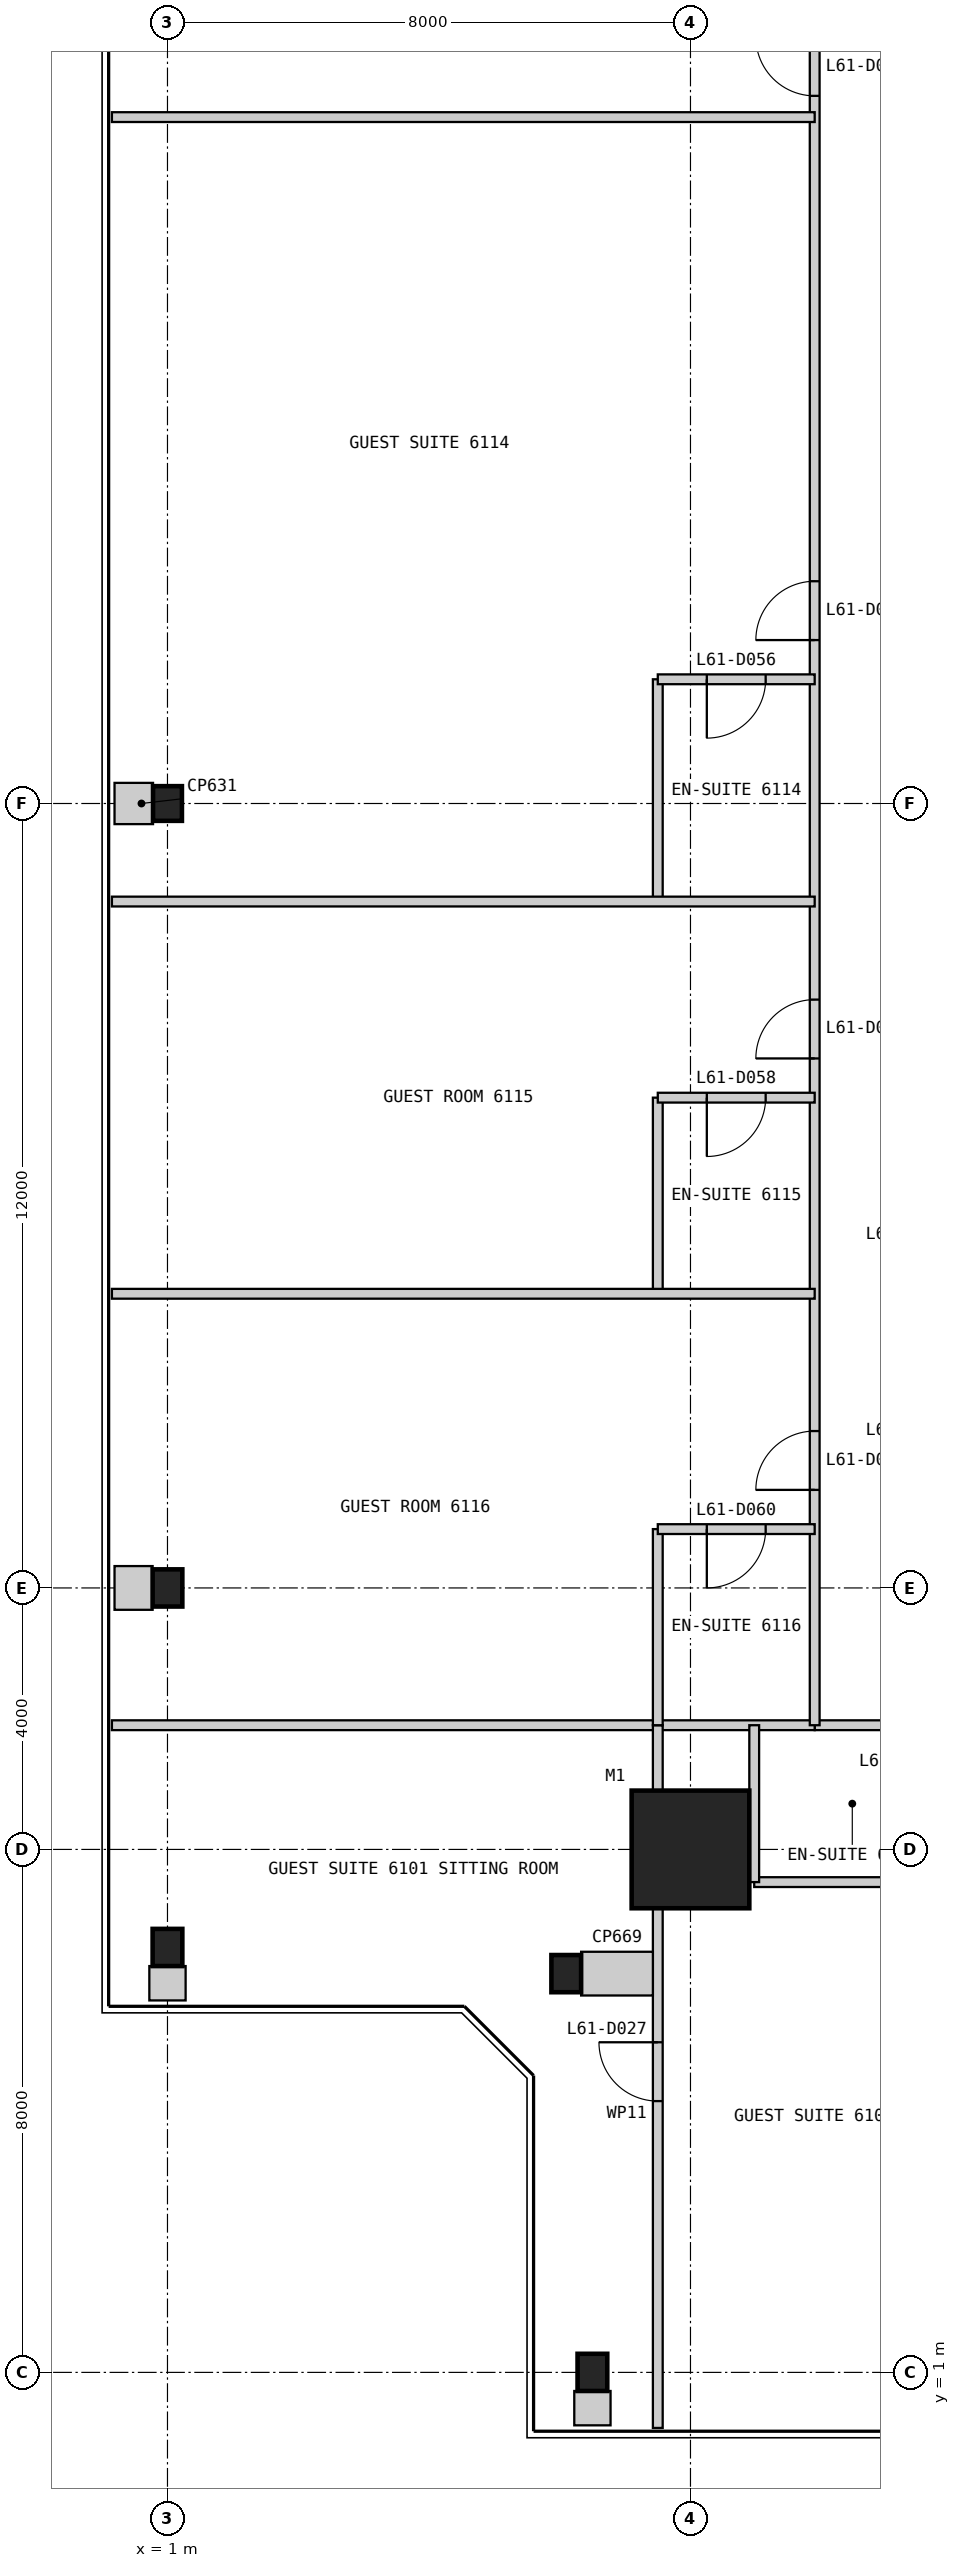
"""IFC4 building model, lengths in metres.
Left out: names, types, materials, properties, quantities, classifications, styles, units other than length and angle.
Written with IfcOpenShell. Run it as: python <this file> out.ifc"""

import sys

from ifc_helpers import new_model, si_unit, direction, frame, frame_2d, origin, origin_2d, place, context, subcontext, project, spatial, rectangle, i_section, extrude, element, fill, save


model = new_model("IFC4")
c1 = context("Model", 3, precision=1e-05, world=origin(), true_north=direction((0.0, 1.0)))
c2 = subcontext(c1, "Body", "Model", "MODEL_VIEW")
j1 = project(units=[si_unit("LENGTHUNIT", "METRE"), si_unit("PLANEANGLEUNIT", "RADIAN")], contexts=[c1])
p1 = place(None, origin())
s1 = spatial("IfcSite", under=j1, at=p1, CompositionType="ELEMENT")
p2 = place(p1, origin())
s2 = spatial("IfcBuilding", under=s1, at=p2, CompositionType="ELEMENT")
p3 = place(p2, frame((0.0, 0.0, 259.4)))
s3 = spatial("IfcBuildingStorey", under=s2, at=p3, CompositionType="ELEMENT", Elevation=259.4)
p4 = place(p3, frame((9.0, 9.0, 0.0), z_axis=(0.0, 0.0, 1.0), x_axis=(1.0, 0.0, 0.0)))
e1 = element("IfcColumn", 1, at=p4, inside=s3, PredefinedType="COLUMN", context=c2, shape_type="SweptSolid", body=[
    extrude(rectangle(XDim=1.8, YDim=1.8, at=origin_2d()), origin(), (0.0, 0.0, 1.0), 3.4),
])
p5 = place(p3, frame((7.5, 1.0, 0.0), z_axis=(0.0, 0.0, 1.0), x_axis=(1.0, 0.0, 0.0)))
e2 = element("IfcColumn", 2, at=p5, inside=s3, PredefinedType="COLUMN", context=c2, shape_type="SweptSolid", body=[
    extrude(i_section(OverallWidth=0.455, OverallDepth=0.569, WebThickness=0.078, FlangeThickness=0.125, at=origin_2d()), origin(), (0.0, 0.0, 1.0), 3.4),
])
p6 = place(p3, frame((1.0, 25.0, 0.0), z_axis=(0.0, 0.0, 1.0), x_axis=(1.0, 0.0, 0.0)))
e3 = element("IfcColumn", 3, at=p6, inside=s3, PredefinedType="COLUMN", context=c2, shape_type="SweptSolid", body=[
    extrude(i_section(OverallWidth=0.442, OverallDepth=0.531, WebThickness=0.066, FlangeThickness=0.106, at=origin_2d()), origin(), (0.0, 0.0, 1.0), 3.4),
])
for number, where, z_axis, x_axis in (
    (4, (1.0, 13.0, 0.0), (0.0, 0.0, 1.0), (1.0, 0.0, 0.0)),
    (5, (1.0, 7.5, 0.0), (0.0, 0.0, 1.0), (1.0, 0.0, 0.0)),
    (6, (7.1, 7.1, 0.0), (0.0, 0.0, 1.0), (1.0, 0.0, 0.0)),
):
    element("IfcColumn", number, at=place(p3, frame(where, z_axis=z_axis, x_axis=x_axis)), inside=s3, PredefinedType="COLUMN", context=c2, shape_type="SweptSolid", body=[
        extrude(i_section(OverallWidth=0.455, OverallDepth=0.569, WebThickness=0.078, FlangeThickness=0.125, at=origin_2d()), origin(), (0.0, 0.0, 1.0), 3.4),
    ])
p7 = place(p3, frame((10.9, 10.9, 0.0), z_axis=(0.0, 0.0, 1.0), x_axis=(1.0, 0.0, 0.0)))
e7 = element("IfcWall", 7, at=p7, inside=s3, PredefinedType="PARTITIONING", context=c2, shape_type="SweptSolid", body=[
    extrude(rectangle(XDim=28.2, YDim=0.15, at=frame_2d((14.1, 0.0))), origin(), (0.0, 0.0, 1.0), 3.25),
])
p8 = place(p7, frame((2.375, 0.0, 0.0)))
e8 = element("IfcOpeningElement", 8, at=p8, cuts=e7, PredefinedType="OPENING", context=c2, shape_type="SweptSolid", body=[
    extrude(rectangle(XDim=0.9, YDim=2.1, at=frame_2d((0.45, 1.05))), frame((0.0, 0.085, 0.0), z_axis=(0.0, -1.0, 0.0), x_axis=(1.0, 0.0, 0.0)), (0.0, 0.0, 1.0), 0.17),
])
p9 = place(p7, frame((10.7, 0.0, 0.0)))
e9 = element("IfcOpeningElement", 9, at=p9, cuts=e7, PredefinedType="OPENING", context=c2, shape_type="SweptSolid", body=[
    extrude(rectangle(XDim=0.9, YDim=2.1, at=frame_2d((0.45, 1.05))), frame((0.0, 0.085, 0.0), z_axis=(0.0, -1.0, 0.0), x_axis=(1.0, 0.0, 0.0)), (0.0, 0.0, 1.0), 0.17),
])
p10 = place(p7, frame((16.8, 0.0, 0.0)))
e10 = element("IfcOpeningElement", 10, at=p10, cuts=e7, PredefinedType="OPENING", context=c2, shape_type="SweptSolid", body=[
    extrude(rectangle(XDim=1.0, YDim=2.1, at=frame_2d((0.5, 1.05))), frame((0.0, 0.085, 0.0), z_axis=(0.0, -1.0, 0.0), x_axis=(1.0, 0.0, 0.0)), (0.0, 0.0, 1.0), 0.17),
])
p11 = place(p7, frame((23.7, 0.0, 0.0)))
e11 = element("IfcOpeningElement", 11, at=p11, cuts=e7, PredefinedType="OPENING", context=c2, shape_type="SweptSolid", body=[
    extrude(rectangle(XDim=0.9, YDim=2.1, at=frame_2d((0.45, 1.05))), frame((0.0, 0.085, 0.0), z_axis=(0.0, -1.0, 0.0), x_axis=(1.0, 0.0, 0.0)), (0.0, 0.0, 1.0), 0.17),
])
p12 = place(p3, frame((0.15, 10.9, 0.0), z_axis=(0.0, 0.0, 1.0), x_axis=(1.0, 0.0, 0.0)))
e12 = element("IfcWall", 12, at=p12, inside=s3, PredefinedType="PARTITIONING", context=c2, shape_type="SweptSolid", body=[
    extrude(rectangle(XDim=10.75, YDim=0.15, at=frame_2d((5.375, 0.0))), origin(), (0.0, 0.0, 1.0), 3.25),
])
p13 = place(p3, frame((9.975, 8.5, 0.0), z_axis=(0.0, 0.0, 1.0), x_axis=(1.0, 0.0, 0.0)))
e13 = element("IfcWall", 13, at=p13, inside=s3, PredefinedType="PARTITIONING", context=c2, shape_type="SweptSolid", body=[
    extrude(rectangle(XDim=3.0, YDim=0.15, at=frame_2d((1.5, 0.0))), origin(), (0.0, 0.0, 1.0), 3.25),
])
p14 = place(p3, frame((9.975, 8.5, 0.0), z_axis=(0.0, 0.0, 1.0), x_axis=(0.0, 1.0, 0.0)))
e14 = element("IfcWall", 14, at=p14, inside=s3, PredefinedType="PARTITIONING", context=c2, shape_type="SweptSolid", body=[
    extrude(rectangle(XDim=2.4, YDim=0.15, at=frame_2d((1.2, 0.0))), origin(), (0.0, 0.0, 1.0), 3.25),
])
p15 = place(p3, frame((8.5, 0.15, 0.0), z_axis=(0.0, 0.0, 1.0), x_axis=(0.0, 1.0, 0.0)))
e15 = element("IfcWall", 15, at=p15, inside=s3, PredefinedType="PARTITIONING", context=c2, shape_type="SweptSolid", body=[
    extrude(rectangle(XDim=10.75, YDim=0.15, at=frame_2d((5.375, 0.0))), origin(), (0.0, 0.0, 1.0), 3.25),
])
p16 = place(p15, frame((5.0, 0.0, 0.0)))
e16 = element("IfcOpeningElement", 16, at=p16, cuts=e15, PredefinedType="OPENING", context=c2, shape_type="SweptSolid", body=[
    extrude(rectangle(XDim=0.9, YDim=2.1, at=frame_2d((0.45, 1.05))), frame((0.0, 0.085, 0.0), z_axis=(0.0, -1.0, 0.0), x_axis=(1.0, 0.0, 0.0)), (0.0, 0.0, 1.0), 0.17),
])
p17 = place(p3, frame((10.9, 39.1, 0.0), z_axis=(0.0, 0.0, 1.0), x_axis=(0.0, -1.0, 0.0)))
e17 = element("IfcWall", 17, at=p17, inside=s3, PredefinedType="PARTITIONING", context=c2, shape_type="SweptSolid", body=[
    extrude(rectangle(XDim=28.2, YDim=0.15, at=frame_2d((14.1, 0.0))), origin(), (0.0, 0.0, 1.0), 3.25),
])
p18 = place(p17, frame((2.375, 0.0, 0.0)))
e18 = element("IfcOpeningElement", 18, at=p18, cuts=e17, PredefinedType="OPENING", context=c2, shape_type="SweptSolid", body=[
    extrude(rectangle(XDim=0.9, YDim=2.1, at=frame_2d((0.45, 1.05))), frame((0.0, 0.085, 0.0), z_axis=(0.0, -1.0, 0.0), x_axis=(1.0, 0.0, 0.0)), (0.0, 0.0, 1.0), 0.17),
])
p19 = place(p17, frame((10.7, 0.0, 0.0)))
e19 = element("IfcOpeningElement", 19, at=p19, cuts=e17, PredefinedType="OPENING", context=c2, shape_type="SweptSolid", body=[
    extrude(rectangle(XDim=0.9, YDim=2.1, at=frame_2d((0.45, 1.05))), frame((0.0, 0.085, 0.0), z_axis=(0.0, -1.0, 0.0), x_axis=(1.0, 0.0, 0.0)), (0.0, 0.0, 1.0), 0.17),
])
p20 = place(p17, frame((17.1, 0.0, 0.0)))
e20 = element("IfcOpeningElement", 20, at=p20, cuts=e17, PredefinedType="OPENING", context=c2, shape_type="SweptSolid", body=[
    extrude(rectangle(XDim=0.9, YDim=2.1, at=frame_2d((0.45, 1.05))), frame((0.0, 0.085, 0.0), z_axis=(0.0, -1.0, 0.0), x_axis=(1.0, 0.0, 0.0)), (0.0, 0.0, 1.0), 0.17),
])
p21 = place(p17, frame((23.7, 0.0, 0.0)))
e21 = element("IfcOpeningElement", 21, at=p21, cuts=e17, PredefinedType="OPENING", context=c2, shape_type="SweptSolid", body=[
    extrude(rectangle(XDim=0.9, YDim=2.1, at=frame_2d((0.45, 1.05))), frame((0.0, 0.085, 0.0), z_axis=(0.0, -1.0, 0.0), x_axis=(1.0, 0.0, 0.0)), (0.0, 0.0, 1.0), 0.17),
])
p22 = place(p3, frame((0.15, 35.5, 0.0), z_axis=(0.0, 0.0, 1.0), x_axis=(1.0, 0.0, 0.0)))
e22 = element("IfcWall", 22, at=p22, inside=s3, PredefinedType="PARTITIONING", context=c2, shape_type="SweptSolid", body=[
    extrude(rectangle(XDim=10.75, YDim=0.15, at=frame_2d((5.375, 0.0))), origin(), (0.0, 0.0, 1.0), 3.25),
])
p23 = place(p3, frame((8.5, 26.9, 0.0), z_axis=(0.0, 0.0, 1.0), x_axis=(0.0, -1.0, 0.0)))
e23 = element("IfcWall", 23, at=p23, inside=s3, PredefinedType="PARTITIONING", context=c2, shape_type="SweptSolid", body=[
    extrude(rectangle(XDim=3.4, YDim=0.15, at=frame_2d((1.7, 0.0))), origin(), (0.0, 0.0, 1.0), 3.25),
])
p24 = place(p3, frame((8.5, 26.9, 0.0), z_axis=(0.0, 0.0, 1.0), x_axis=(1.0, 0.0, 0.0)))
e24 = element("IfcWall", 24, at=p24, inside=s3, PredefinedType="PARTITIONING", context=c2, shape_type="SweptSolid", body=[
    extrude(rectangle(XDim=2.4, YDim=0.15, at=frame_2d((1.2, 0.0))), origin(), (0.0, 0.0, 1.0), 3.25),
])
p25 = place(p24, frame((0.75, 0.0, 0.0)))
e25 = element("IfcOpeningElement", 25, at=p25, cuts=e24, PredefinedType="OPENING", context=c2, shape_type="SweptSolid", body=[
    extrude(rectangle(XDim=0.9, YDim=2.1, at=frame_2d((0.45, 1.05))), frame((0.0, 0.085, 0.0), z_axis=(0.0, -1.0, 0.0), x_axis=(1.0, 0.0, 0.0)), (0.0, 0.0, 1.0), 0.17),
])
p26 = place(p3, frame((0.15, 23.5, 0.0), z_axis=(0.0, 0.0, 1.0), x_axis=(1.0, 0.0, 0.0)))
e26 = element("IfcWall", 26, at=p26, inside=s3, PredefinedType="PARTITIONING", context=c2, shape_type="SweptSolid", body=[
    extrude(rectangle(XDim=10.75, YDim=0.15, at=frame_2d((5.375, 0.0))), origin(), (0.0, 0.0, 1.0), 3.25),
])
p27 = place(p3, frame((8.5, 20.5, 0.0), z_axis=(0.0, 0.0, 1.0), x_axis=(0.0, -1.0, 0.0)))
e27 = element("IfcWall", 27, at=p27, inside=s3, PredefinedType="PARTITIONING", context=c2, shape_type="SweptSolid", body=[
    extrude(rectangle(XDim=3.0, YDim=0.15, at=frame_2d((1.5, 0.0))), origin(), (0.0, 0.0, 1.0), 3.25),
])
p28 = place(p3, frame((8.5, 20.5, 0.0), z_axis=(0.0, 0.0, 1.0), x_axis=(1.0, 0.0, 0.0)))
e28 = element("IfcWall", 28, at=p28, inside=s3, PredefinedType="PARTITIONING", context=c2, shape_type="SweptSolid", body=[
    extrude(rectangle(XDim=2.4, YDim=0.15, at=frame_2d((1.2, 0.0))), origin(), (0.0, 0.0, 1.0), 3.25),
])
p29 = place(p28, frame((0.75, 0.0, 0.0)))
e29 = element("IfcOpeningElement", 29, at=p29, cuts=e28, PredefinedType="OPENING", context=c2, shape_type="SweptSolid", body=[
    extrude(rectangle(XDim=0.9, YDim=2.1, at=frame_2d((0.45, 1.05))), frame((0.0, 0.085, 0.0), z_axis=(0.0, -1.0, 0.0), x_axis=(1.0, 0.0, 0.0)), (0.0, 0.0, 1.0), 0.17),
])
p30 = place(p3, frame((0.15, 17.5, 0.0), z_axis=(0.0, 0.0, 1.0), x_axis=(1.0, 0.0, 0.0)))
e30 = element("IfcWall", 30, at=p30, inside=s3, PredefinedType="PARTITIONING", context=c2, shape_type="SweptSolid", body=[
    extrude(rectangle(XDim=10.75, YDim=0.15, at=frame_2d((5.375, 0.0))), origin(), (0.0, 0.0, 1.0), 3.25),
])
p31 = place(p3, frame((8.5, 13.9, 0.0), z_axis=(0.0, 0.0, 1.0), x_axis=(0.0, -1.0, 0.0)))
e31 = element("IfcWall", 31, at=p31, inside=s3, PredefinedType="PARTITIONING", context=c2, shape_type="SweptSolid", body=[
    extrude(rectangle(XDim=3.0, YDim=0.15, at=frame_2d((1.5, 0.0))), origin(), (0.0, 0.0, 1.0), 3.25),
])
p32 = place(p3, frame((8.5, 13.9, 0.0), z_axis=(0.0, 0.0, 1.0), x_axis=(1.0, 0.0, 0.0)))
e32 = element("IfcWall", 32, at=p32, inside=s3, PredefinedType="PARTITIONING", context=c2, shape_type="SweptSolid", body=[
    extrude(rectangle(XDim=2.4, YDim=0.15, at=frame_2d((1.2, 0.0))), origin(), (0.0, 0.0, 1.0), 3.25),
])
p33 = place(p32, frame((0.75, 0.0, 0.0)))
e33 = element("IfcOpeningElement", 33, at=p33, cuts=e32, PredefinedType="OPENING", context=c2, shape_type="SweptSolid", body=[
    extrude(rectangle(XDim=0.9, YDim=2.1, at=frame_2d((0.45, 1.05))), frame((0.0, 0.085, 0.0), z_axis=(0.0, -1.0, 0.0), x_axis=(1.0, 0.0, 0.0)), (0.0, 0.0, 1.0), 0.17),
])
for number, where, z_axis, x_axis in (
    (34, (7.5, 0.19, 0.0), (0.0, 0.0, 1.0), (0.0, 1.0, 0.0)),
    (35, (1.0, 6.69, 0.0), (0.0, 0.0, 1.0), (0.0, 1.0, 0.0)),
):
    element("IfcWall", number, at=place(p3, frame(where, z_axis=z_axis, x_axis=x_axis)), inside=s3, PredefinedType="PARTITIONING", context=c2, shape_type="SweptSolid", body=[
        extrude(rectangle(XDim=0.526, YDim=0.555, at=frame_2d((0.263, 0.0))), origin(), (0.0, 0.0, 1.0), 3.25),
    ])
p34 = place(p3, frame((8.425, 7.1, 0.0), z_axis=(0.0, 0.0, 1.0), x_axis=(-1.0, 0.0, 0.0)))
e36 = element("IfcWall", 36, at=p34, inside=s3, PredefinedType="PARTITIONING", context=c2, shape_type="SweptSolid", body=[
    extrude(rectangle(XDim=1.098, YDim=0.669, at=frame_2d((0.549, 0.0))), origin(), (0.0, 0.0, 1.0), 3.25),
])
p35 = place(p3, frame((0.19, 25.0, 0.0), z_axis=(0.0, 0.0, 1.0), x_axis=(1.0, 0.0, 0.0)))
e37 = element("IfcWall", 37, at=p35, inside=s3, PredefinedType="PARTITIONING", context=c2, shape_type="SweptSolid", body=[
    extrude(rectangle(XDim=0.589, YDim=0.631, at=frame_2d((0.294, 0.0))), origin(), (0.0, 0.0, 1.0), 3.25),
])
p36 = place(p3, frame((0.19, 13.0, 0.0), z_axis=(0.0, 0.0, 1.0), x_axis=(1.0, 0.0, 0.0)))
e38 = element("IfcWall", 38, at=p36, inside=s3, PredefinedType="PARTITIONING", context=c2, shape_type="SweptSolid", body=[
    extrude(rectangle(XDim=0.583, YDim=0.669, at=frame_2d((0.292, 0.0))), origin(), (0.0, 0.0, 1.0), 3.25),
])
p37 = place(p16, origin())
e39 = element("IfcDoor", 39, at=p37, inside=s3, OperationType="SINGLE_SWING_RIGHT", PredefinedType="DOOR", context=c2, shape_type="SweptSolid", body=[
    extrude(rectangle(XDim=0.9, YDim=2.1, at=frame_2d((0.45, 1.05))), frame((0.0, 0.025, 0.0), z_axis=(0.0, -1.0, 0.0), x_axis=(1.0, 0.0, 0.0)), (0.0, 0.0, 1.0), 0.05),
])
fill(e16, e39)
p38 = place(p18, frame((0.9, 0.0, 0.0), z_axis=(0.0, 0.0, 1.0), x_axis=(-1.0, 0.0, 0.0)))
e40 = element("IfcDoor", 40, at=p38, inside=s3, OperationType="SINGLE_SWING_RIGHT", PredefinedType="DOOR", context=c2, shape_type="SweptSolid", body=[
    extrude(rectangle(XDim=0.9, YDim=2.1, at=frame_2d((0.45, 1.05))), frame((0.0, 0.025, 0.0), z_axis=(0.0, -1.0, 0.0), x_axis=(1.0, 0.0, 0.0)), (0.0, 0.0, 1.0), 0.05),
])
fill(e18, e40)
p39 = place(p25, frame((0.9, 0.0, 0.0), z_axis=(0.0, 0.0, 1.0), x_axis=(-1.0, 0.0, 0.0)))
e41 = element("IfcDoor", 41, at=p39, inside=s3, OperationType="SINGLE_SWING_RIGHT", PredefinedType="DOOR", context=c2, shape_type="SweptSolid", body=[
    extrude(rectangle(XDim=0.9, YDim=2.1, at=frame_2d((0.45, 1.05))), frame((0.0, 0.025, 0.0), z_axis=(0.0, -1.0, 0.0), x_axis=(1.0, 0.0, 0.0)), (0.0, 0.0, 1.0), 0.05),
])
fill(e25, e41)
p40 = place(p19, frame((0.9, 0.0, 0.0), z_axis=(0.0, 0.0, 1.0), x_axis=(-1.0, 0.0, 0.0)))
e42 = element("IfcDoor", 42, at=p40, inside=s3, OperationType="SINGLE_SWING_LEFT", PredefinedType="DOOR", context=c2, shape_type="SweptSolid", body=[
    extrude(rectangle(XDim=0.9, YDim=2.1, at=frame_2d((0.45, 1.05))), frame((0.0, 0.025, 0.0), z_axis=(0.0, -1.0, 0.0), x_axis=(1.0, 0.0, 0.0)), (0.0, 0.0, 1.0), 0.05),
])
fill(e19, e42)
p41 = place(p29, frame((0.9, 0.0, 0.0), z_axis=(0.0, 0.0, 1.0), x_axis=(-1.0, 0.0, 0.0)))
e43 = element("IfcDoor", 43, at=p41, inside=s3, OperationType="SINGLE_SWING_RIGHT", PredefinedType="DOOR", context=c2, shape_type="SweptSolid", body=[
    extrude(rectangle(XDim=0.9, YDim=2.1, at=frame_2d((0.45, 1.05))), frame((0.0, 0.025, 0.0), z_axis=(0.0, -1.0, 0.0), x_axis=(1.0, 0.0, 0.0)), (0.0, 0.0, 1.0), 0.05),
])
fill(e29, e43)
p42 = place(p20, frame((0.9, 0.0, 0.0), z_axis=(0.0, 0.0, 1.0), x_axis=(-1.0, 0.0, 0.0)))
e44 = element("IfcDoor", 44, at=p42, inside=s3, OperationType="SINGLE_SWING_LEFT", PredefinedType="DOOR", context=c2, shape_type="SweptSolid", body=[
    extrude(rectangle(XDim=0.9, YDim=2.1, at=frame_2d((0.45, 1.05))), frame((0.0, 0.025, 0.0), z_axis=(0.0, -1.0, 0.0), x_axis=(1.0, 0.0, 0.0)), (0.0, 0.0, 1.0), 0.05),
])
fill(e20, e44)
p43 = place(p33, frame((0.9, 0.0, 0.0), z_axis=(0.0, 0.0, 1.0), x_axis=(-1.0, 0.0, 0.0)))
e45 = element("IfcDoor", 45, at=p43, inside=s3, OperationType="SINGLE_SWING_RIGHT", PredefinedType="DOOR", context=c2, shape_type="SweptSolid", body=[
    extrude(rectangle(XDim=0.9, YDim=2.1, at=frame_2d((0.45, 1.05))), frame((0.0, 0.025, 0.0), z_axis=(0.0, -1.0, 0.0), x_axis=(1.0, 0.0, 0.0)), (0.0, 0.0, 1.0), 0.05),
])
fill(e33, e45)
p44 = place(p21, frame((0.9, 0.0, 0.0), z_axis=(0.0, 0.0, 1.0), x_axis=(-1.0, 0.0, 0.0)))
e46 = element("IfcDoor", 46, at=p44, inside=s3, OperationType="SINGLE_SWING_LEFT", PredefinedType="DOOR", context=c2, shape_type="SweptSolid", body=[
    extrude(rectangle(XDim=0.9, YDim=2.1, at=frame_2d((0.45, 1.05))), frame((0.0, 0.025, 0.0), z_axis=(0.0, -1.0, 0.0), x_axis=(1.0, 0.0, 0.0)), (0.0, 0.0, 1.0), 0.05),
])
fill(e21, e46)
save(model, sys.argv[1])
